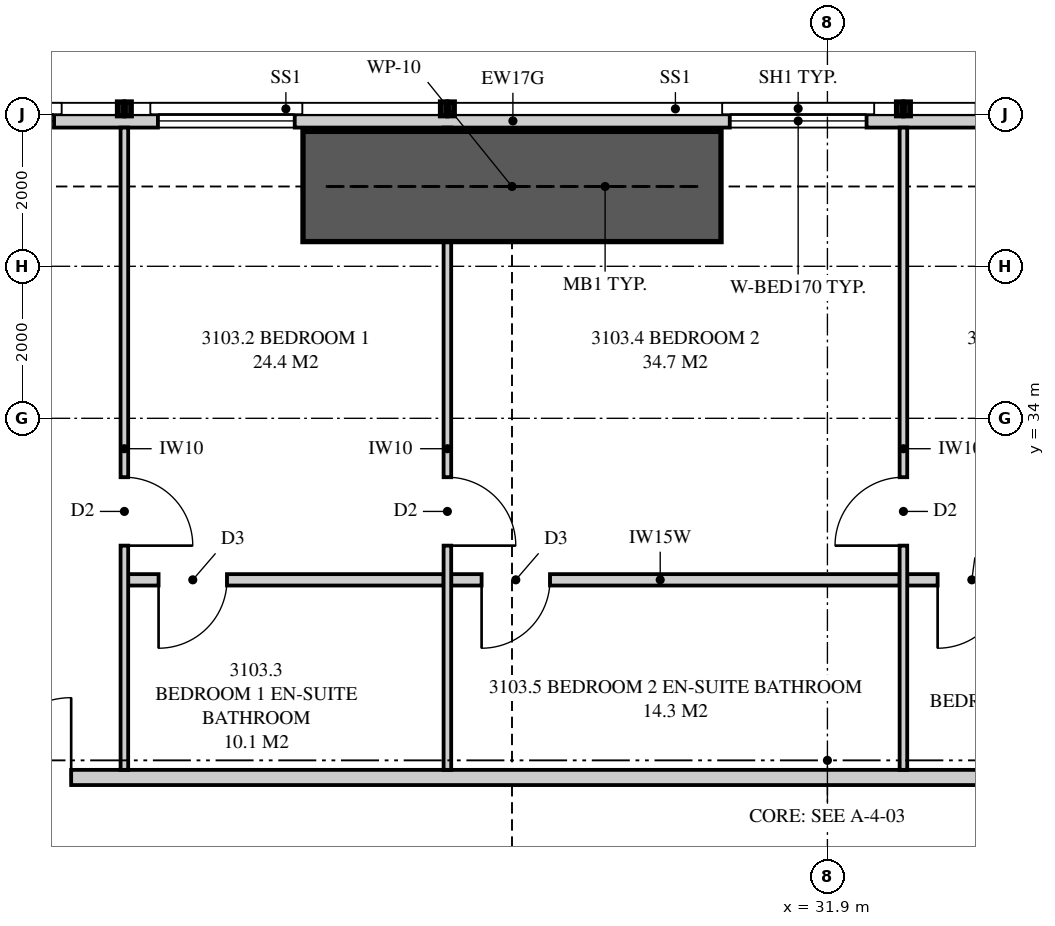
"""IFC4 building model, lengths in metres.
Left out: names, types, materials, properties, quantities, classifications, styles, units other than length and angle.
Written with IfcOpenShell. Run it as: python <this file> out.ifc"""

import sys

from ifc_helpers import new_model, si_unit, direction, frame, frame_2d, origin, place, context, subcontext, project, spatial, polyline, rectangle, outline, extrude, element, fill, save


model = new_model("IFC4")
c1 = context("Model", 3, precision=1e-05, world=origin(), true_north=direction((0.0, 1.0)))
c2 = subcontext(c1, "Body", "Model", "MODEL_VIEW")
j1 = project(units=[si_unit("LENGTHUNIT", "METRE"), si_unit("PLANEANGLEUNIT", "RADIAN")], contexts=[c1])
p1 = place(None, origin())
s1 = spatial("IfcSite", under=j1, at=p1, CompositionType="ELEMENT")
p2 = place(p1, origin())
s2 = spatial("IfcBuilding", under=s1, at=p2, CompositionType="ELEMENT")
p3 = place(p2, frame((0.0, 0.0, 114.9)))
s3 = spatial("IfcBuildingStorey", under=s2, at=p3, CompositionType="ELEMENT", Elevation=114.9)
p4 = place(p3, frame((41.449, 37.913, 0.0), z_axis=(0.0, 0.0, 1.0), x_axis=(-1.0, 0.0, 0.0)))
e1 = element("IfcWall", 1, at=p4, inside=s3, PredefinedType="SOLIDWALL", context=c2, shape_type="SweptSolid", body=[
    extrude(outline(polyline([(0.0, 0.0), (27.374, 0.0), (27.374, 3.11), (24.777, 3.11), (24.777, 2.15), (24.732, 2.15), (24.732, 3.11), (24.574, 3.11), (24.574, 2.15), (2.824, 2.15), (2.824, 3.11), (2.666, 3.11), (2.666, 2.15), (2.62, 2.15), (2.62, 3.11), (0.0, 3.11), (0.0, 0.0)])), frame((0.0, 0.087, 0.0), z_axis=(0.0, -1.0, 0.0), x_axis=(1.0, 0.0, 0.0)), (0.0, 0.0, 1.0), 0.175),
])
p5 = place(p4, frame((5.699, 0.0, 0.4)))
e2 = element("IfcOpeningElement", 2, at=p5, cuts=e1, PredefinedType="OPENING", context=c2, shape_type="SweptSolid", body=[
    extrude(rectangle(XDim=1.8, YDim=1.7, at=frame_2d((0.9, 0.85))), frame((0.0, 0.097, 0.0), z_axis=(0.0, -1.0, 0.0), x_axis=(1.0, 0.0, 0.0)), (0.0, 0.0, 1.0), 0.195),
])
p6 = place(p4, frame((9.034, 0.0, 0.4)))
e3 = element("IfcOpeningElement", 3, at=p6, cuts=e1, PredefinedType="OPENING", context=c2, shape_type="SweptSolid", body=[
    extrude(rectangle(XDim=1.8, YDim=1.7, at=frame_2d((0.9, 0.85))), frame((0.0, 0.097, 0.0), z_axis=(0.0, -1.0, 0.0), x_axis=(1.0, 0.0, 0.0)), (0.0, 0.0, 1.0), 0.195),
])
p7 = place(p4, frame((16.558, 0.0, 0.4)))
e4 = element("IfcOpeningElement", 4, at=p7, cuts=e1, PredefinedType="OPENING", context=c2, shape_type="SweptSolid", body=[
    extrude(rectangle(XDim=1.8, YDim=1.7, at=frame_2d((0.9, 0.85))), frame((0.0, 0.097, 0.0), z_axis=(0.0, -1.0, 0.0), x_axis=(1.0, 0.0, 0.0)), (0.0, 0.0, 1.0), 0.195),
])
p8 = place(p4, frame((19.724, 0.0, 0.4)))
e5 = element("IfcOpeningElement", 5, at=p8, cuts=e1, PredefinedType="OPENING", context=c2, shape_type="SweptSolid", body=[
    extrude(rectangle(XDim=1.8, YDim=1.7, at=frame_2d((0.9, 0.85))), frame((0.0, 0.097, 0.0), z_axis=(0.0, -1.0, 0.0), x_axis=(1.0, 0.0, 0.0)), (0.0, 0.0, 1.0), 0.195),
])
p9 = place(p3, frame((17.775, 29.275, 0.0), z_axis=(0.0, 0.0, 1.0), x_axis=(1.0, 0.0, 0.0)))
e6 = element("IfcWall", 6, at=p9, inside=s3, PredefinedType="PARTITIONING", context=c2, shape_type="SweptSolid", body=[
    extrude(outline(polyline([(0.0, 0.0), (18.925, 0.0), (18.925, 3.11), (10.312, 3.11), (10.312, 2.541), (9.638, 2.541), (9.638, 3.11), (0.0, 3.11), (0.0, 0.0)])), frame((0.0, 0.1, 0.0), z_axis=(0.0, -1.0, 0.0), x_axis=(1.0, 0.0, 0.0)), (0.0, 0.0, 1.0), 0.2),
])
p10 = place(p9, frame((3.125, 0.0, 0.0)))
e7 = element("IfcOpeningElement", 7, at=p10, cuts=e6, PredefinedType="OPENING", context=c2, shape_type="SweptSolid", body=[
    extrude(rectangle(XDim=1.05, YDim=2.2, at=frame_2d((0.525, 1.1))), frame((0.0, 0.11, 0.0), z_axis=(0.0, -1.0, 0.0), x_axis=(1.0, 0.0, 0.0)), (0.0, 0.0, 1.0), 0.22),
])
p11 = place(p3, frame((22.65, 37.825, 0.0), z_axis=(0.0, 0.0, 1.0), x_axis=(0.0, -1.0, 0.0)))
e8 = element("IfcWall", 8, at=p11, inside=s3, PredefinedType="PARTITIONING", context=c2, shape_type="SweptSolid", body=[
    extrude(outline(polyline([(0.0, 0.0), (8.45, 0.0), (8.45, 3.11), (1.635, 3.11), (1.635, 2.15), (0.0, 2.15), (0.0, 3.11), (0.0, 0.0)])), frame((0.0, 0.05, 0.0), z_axis=(0.0, -1.0, 0.0), x_axis=(1.0, 0.0, 0.0)), (0.0, 0.0, 1.0), 0.1),
])
p12 = place(p11, frame((4.6, 0.0, 0.0)))
e9 = element("IfcOpeningElement", 9, at=p12, cuts=e8, PredefinedType="OPENING", context=c2, shape_type="SweptSolid", body=[
    extrude(rectangle(XDim=0.9, YDim=2.1, at=frame_2d((0.45, 1.05))), frame((0.0, 0.06, 0.0), z_axis=(0.0, -1.0, 0.0), x_axis=(1.0, 0.0, 0.0)), (0.0, 0.0, 1.0), 0.12),
])
p13 = place(p3, frame((26.9, 37.825, 0.0), z_axis=(0.0, 0.0, 1.0), x_axis=(0.0, -1.0, 0.0)))
e10 = element("IfcWall", 10, at=p13, inside=s3, PredefinedType="PARTITIONING", context=c2, shape_type="SweptSolid", body=[
    extrude(outline(polyline([(0.529, 2.15), (0.0, 2.15), (0.0, 0.0), (0.529, 0.0), (0.529, 0.889), (1.021, 0.889), (1.021, 0.0), (8.45, 0.0), (8.45, 3.11), (1.635, 3.11), (1.635, 2.15), (1.021, 2.15), (1.021, 1.261), (0.529, 1.261), (0.529, 2.15)])), frame((0.0, 0.05, 0.0), z_axis=(0.0, -1.0, 0.0), x_axis=(1.0, 0.0, 0.0)), (0.0, 0.0, 1.0), 0.1),
])
p14 = place(p13, frame((4.6, 0.0, 0.0)))
e11 = element("IfcOpeningElement", 11, at=p14, cuts=e10, PredefinedType="OPENING", context=c2, shape_type="SweptSolid", body=[
    extrude(rectangle(XDim=0.9, YDim=2.1, at=frame_2d((0.45, 1.05))), frame((0.0, 0.06, 0.0), z_axis=(0.0, -1.0, 0.0), x_axis=(1.0, 0.0, 0.0)), (0.0, 0.0, 1.0), 0.12),
])
p15 = place(p3, frame((32.9, 37.825, 0.0), z_axis=(0.0, 0.0, 1.0), x_axis=(0.0, -1.0, 0.0)))
e12 = element("IfcWall", 12, at=p15, inside=s3, PredefinedType="PARTITIONING", context=c2, shape_type="SweptSolid", body=[
    extrude(outline(polyline([(0.0, 0.0), (8.45, 0.0), (8.45, 3.11), (1.635, 3.11), (1.635, 2.15), (0.0, 2.15), (0.0, 3.11), (0.0, 0.0)])), frame((0.0, 0.05, 0.0), z_axis=(0.0, -1.0, 0.0), x_axis=(1.0, 0.0, 0.0)), (0.0, 0.0, 1.0), 0.1),
])
p16 = place(p15, frame((4.6, 0.0, 0.0)))
e13 = element("IfcOpeningElement", 13, at=p16, cuts=e12, PredefinedType="OPENING", context=c2, shape_type="SweptSolid", body=[
    extrude(rectangle(XDim=0.9, YDim=2.1, at=frame_2d((0.45, 1.05))), frame((0.0, 0.06, 0.0), z_axis=(0.0, -1.0, 0.0), x_axis=(1.0, 0.0, 0.0)), (0.0, 0.0, 1.0), 0.12),
])
p17 = place(p3, frame((22.7, 31.875, 0.0), z_axis=(0.0, 0.0, 1.0), x_axis=(1.0, 0.0, 0.0)))
e14 = element("IfcWall", 14, at=p17, inside=s3, PredefinedType="PLUMBINGWALL", context=c2, shape_type="SweptSolid", body=[
    extrude(rectangle(XDim=4.15, YDim=0.15, at=frame_2d((2.075, 0.0))), origin(), (0.0, 0.0, 1.0), 3.11),
])
p18 = place(p17, frame((0.4, 0.0, 0.0)))
e15 = element("IfcOpeningElement", 15, at=p18, cuts=e14, PredefinedType="OPENING", context=c2, shape_type="SweptSolid", body=[
    extrude(rectangle(XDim=0.9, YDim=2.1, at=frame_2d((0.45, 1.05))), frame((0.0, 0.085, 0.0), z_axis=(0.0, -1.0, 0.0), x_axis=(1.0, 0.0, 0.0)), (0.0, 0.0, 1.0), 0.17),
])
p19 = place(p3, frame((26.95, 31.875, 0.0), z_axis=(0.0, 0.0, 1.0), x_axis=(1.0, 0.0, 0.0)))
e16 = element("IfcWall", 16, at=p19, inside=s3, PredefinedType="PLUMBINGWALL", context=c2, shape_type="SweptSolid", body=[
    extrude(outline(polyline([(0.0, 0.0), (5.9, 0.0), (5.9, 3.11), (1.112, 3.11), (1.112, 2.541), (0.488, 2.541), (0.488, 3.11), (0.0, 3.11), (0.0, 0.0)])), frame((0.0, 0.075, 0.0), z_axis=(0.0, -1.0, 0.0), x_axis=(1.0, 0.0, 0.0)), (0.0, 0.0, 1.0), 0.15),
])
p20 = place(p19, frame((0.4, 0.0, 0.0)))
e17 = element("IfcOpeningElement", 17, at=p20, cuts=e16, PredefinedType="OPENING", context=c2, shape_type="SweptSolid", body=[
    extrude(rectangle(XDim=0.9, YDim=2.1, at=frame_2d((0.45, 1.05))), frame((0.0, 0.085, 0.0), z_axis=(0.0, -1.0, 0.0), x_axis=(1.0, 0.0, 0.0)), (0.0, 0.0, 1.0), 0.17),
])
p21 = place(p3, frame((32.95, 31.875, 0.0), z_axis=(0.0, 0.0, 1.0), x_axis=(1.0, 0.0, 0.0)))
e18 = element("IfcWall", 18, at=p21, inside=s3, PredefinedType="PLUMBINGWALL", context=c2, shape_type="SweptSolid", body=[
    extrude(rectangle(XDim=3.75, YDim=0.15, at=frame_2d((1.875, 0.0))), origin(), (0.0, 0.0, 1.0), 3.11),
])
p22 = place(p21, frame((0.4, 0.0, 0.0)))
e19 = element("IfcOpeningElement", 19, at=p22, cuts=e18, PredefinedType="OPENING", context=c2, shape_type="SweptSolid", body=[
    extrude(rectangle(XDim=0.9, YDim=2.1, at=frame_2d((0.45, 1.05))), frame((0.0, 0.085, 0.0), z_axis=(0.0, -1.0, 0.0), x_axis=(1.0, 0.0, 0.0)), (0.0, 0.0, 1.0), 0.17),
])
p23 = place(p3, frame((25.0, 37.05, 0.0), z_axis=(0.0, 0.0, 1.0), x_axis=(1.0, 0.0, 0.0)))
e20 = element("IfcWall", 20, at=p23, inside=s3, PredefinedType="SHEAR", context=c2, shape_type="SweptSolid", body=[
    extrude(rectangle(XDim=5.5, YDim=1.45, at=frame_2d((2.75, 0.0))), origin(), (0.0, 0.0, 1.0), 3.35),
])
p24 = place(p6, origin())
e21 = element("IfcWindow", 21, at=p24, inside=s3, PartitioningType="SINGLE_PANEL", PredefinedType="WINDOW", context=c2, shape_type="SweptSolid", body=[
    extrude(rectangle(XDim=1.8, YDim=1.7, at=frame_2d((0.9, 0.85))), frame((0.0, 0.03, 0.0), z_axis=(0.0, -1.0, 0.0), x_axis=(1.0, 0.0, 0.0)), (0.0, 0.0, 1.0), 0.06),
])
fill(e3, e21)
p25 = place(p7, origin())
e22 = element("IfcWindow", 22, at=p25, inside=s3, PartitioningType="SINGLE_PANEL", PredefinedType="WINDOW", context=c2, shape_type="SweptSolid", body=[
    extrude(rectangle(XDim=1.8, YDim=1.7, at=frame_2d((0.9, 0.85))), frame((0.0, 0.03, 0.0), z_axis=(0.0, -1.0, 0.0), x_axis=(1.0, 0.0, 0.0)), (0.0, 0.0, 1.0), 0.06),
])
fill(e4, e22)
p26 = place(p8, origin())
e23 = element("IfcWindow", 23, at=p26, inside=s3, PartitioningType="SINGLE_PANEL", PredefinedType="WINDOW", context=c2, shape_type="SweptSolid", body=[
    extrude(rectangle(XDim=1.8, YDim=1.7, at=frame_2d((0.9, 0.85))), frame((0.0, 0.03, 0.0), z_axis=(0.0, -1.0, 0.0), x_axis=(1.0, 0.0, 0.0)), (0.0, 0.0, 1.0), 0.06),
])
fill(e5, e23)
p27 = place(p10, origin())
e24 = element("IfcDoor", 24, at=p27, inside=s3, OperationType="SINGLE_SWING_RIGHT", PredefinedType="DOOR", context=c2, shape_type="SweptSolid", body=[
    extrude(rectangle(XDim=1.05, YDim=2.2, at=frame_2d((0.525, 1.1))), frame((0.0, 0.025, 0.0), z_axis=(0.0, -1.0, 0.0), x_axis=(1.0, 0.0, 0.0)), (0.0, 0.0, 1.0), 0.05),
])
fill(e7, e24)
p28 = place(p12, origin())
e25 = element("IfcDoor", 25, at=p28, inside=s3, OperationType="SINGLE_SWING_RIGHT", PredefinedType="DOOR", context=c2, shape_type="SweptSolid", body=[
    extrude(rectangle(XDim=0.9, YDim=2.1, at=frame_2d((0.45, 1.05))), frame((0.0, 0.025, 0.0), z_axis=(0.0, -1.0, 0.0), x_axis=(1.0, 0.0, 0.0)), (0.0, 0.0, 1.0), 0.05),
])
fill(e9, e25)
p29 = place(p18, frame((0.9, 0.0, 0.0), z_axis=(0.0, 0.0, 1.0), x_axis=(-1.0, 0.0, 0.0)))
e26 = element("IfcDoor", 26, at=p29, inside=s3, OperationType="SINGLE_SWING_RIGHT", PredefinedType="DOOR", context=c2, shape_type="SweptSolid", body=[
    extrude(rectangle(XDim=0.9, YDim=2.1, at=frame_2d((0.45, 1.05))), frame((0.0, 0.025, 0.0), z_axis=(0.0, -1.0, 0.0), x_axis=(1.0, 0.0, 0.0)), (0.0, 0.0, 1.0), 0.05),
])
fill(e15, e26)
p30 = place(p14, origin())
e27 = element("IfcDoor", 27, at=p30, inside=s3, OperationType="SINGLE_SWING_RIGHT", PredefinedType="DOOR", context=c2, shape_type="SweptSolid", body=[
    extrude(rectangle(XDim=0.9, YDim=2.1, at=frame_2d((0.45, 1.05))), frame((0.0, 0.025, 0.0), z_axis=(0.0, -1.0, 0.0), x_axis=(1.0, 0.0, 0.0)), (0.0, 0.0, 1.0), 0.05),
])
fill(e11, e27)
p31 = place(p20, frame((0.9, 0.0, 0.0), z_axis=(0.0, 0.0, 1.0), x_axis=(-1.0, 0.0, 0.0)))
e28 = element("IfcDoor", 28, at=p31, inside=s3, OperationType="SINGLE_SWING_RIGHT", PredefinedType="DOOR", context=c2, shape_type="SweptSolid", body=[
    extrude(rectangle(XDim=0.9, YDim=2.1, at=frame_2d((0.45, 1.05))), frame((0.0, 0.025, 0.0), z_axis=(0.0, -1.0, 0.0), x_axis=(1.0, 0.0, 0.0)), (0.0, 0.0, 1.0), 0.05),
])
fill(e17, e28)
p32 = place(p16, frame((0.9, 0.0, 0.0), z_axis=(0.0, 0.0, 1.0), x_axis=(-1.0, 0.0, 0.0)))
e29 = element("IfcDoor", 29, at=p32, inside=s3, OperationType="SINGLE_SWING_LEFT", PredefinedType="DOOR", context=c2, shape_type="SweptSolid", body=[
    extrude(rectangle(XDim=0.9, YDim=2.1, at=frame_2d((0.45, 1.05))), frame((0.0, 0.025, 0.0), z_axis=(0.0, -1.0, 0.0), x_axis=(1.0, 0.0, 0.0)), (0.0, 0.0, 1.0), 0.05),
])
fill(e13, e29)
p33 = place(p22, frame((0.9, 0.0, 0.0), z_axis=(0.0, 0.0, 1.0), x_axis=(-1.0, 0.0, 0.0)))
e30 = element("IfcDoor", 30, at=p33, inside=s3, OperationType="SINGLE_SWING_RIGHT", PredefinedType="DOOR", context=c2, shape_type="SweptSolid", body=[
    extrude(rectangle(XDim=0.9, YDim=2.1, at=frame_2d((0.45, 1.05))), frame((0.0, 0.025, 0.0), z_axis=(0.0, -1.0, 0.0), x_axis=(1.0, 0.0, 0.0)), (0.0, 0.0, 1.0), 0.05),
])
fill(e19, e30)
save(model, sys.argv[1])
